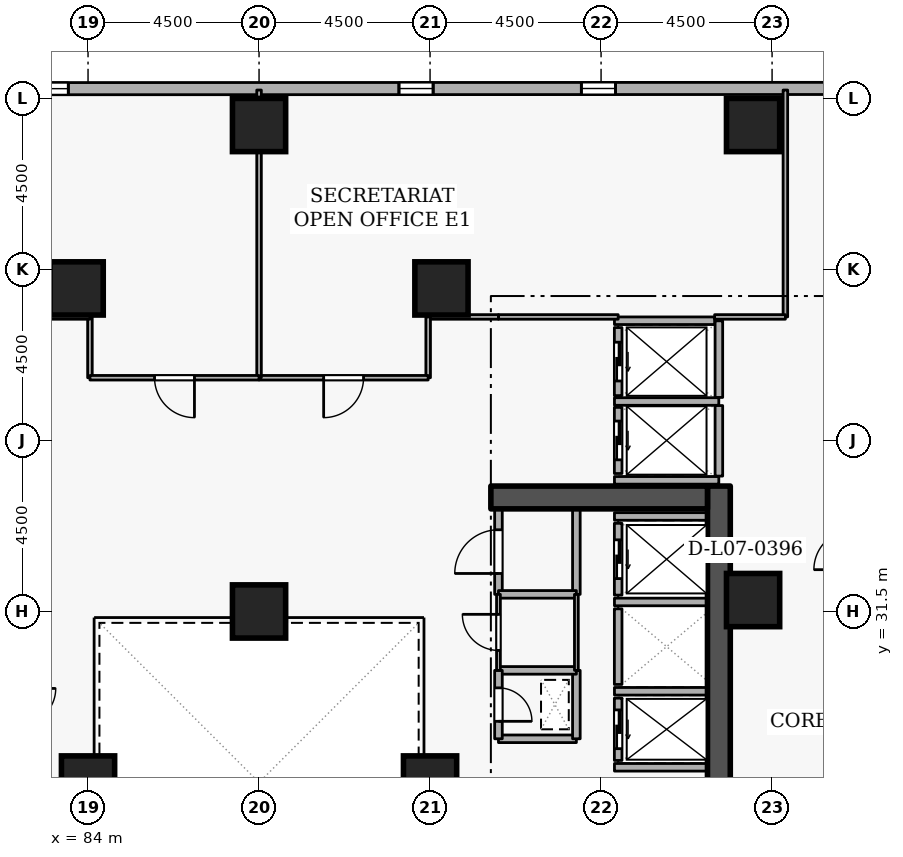
"""IFC4 building model, lengths in metres.
Left out: names, types, materials, properties, quantities, classifications, styles, units other than length and angle.
Written with IfcOpenShell. Run it as: python <this file> out.ifc"""

import sys

from ifc_helpers import new_model, si_unit, direction, frame, frame_2d, origin, origin_2d, place, context, subcontext, project, spatial, rectangle, extrude, element, fill, save


model = new_model("IFC4")
c1 = context("Model", 3, precision=1e-05, world=origin(), true_north=direction((0.0, 1.0)))
c2 = subcontext(c1, "Body", "Model", "MODEL_VIEW")
j1 = project(units=[si_unit("LENGTHUNIT", "METRE"), si_unit("PLANEANGLEUNIT", "RADIAN")], contexts=[c1])
p1 = place(None, origin())
s1 = spatial("IfcSite", under=j1, at=p1, CompositionType="ELEMENT")
p2 = place(p1, origin())
s2 = spatial("IfcBuilding", under=s1, at=p2, CompositionType="ELEMENT")
p3 = place(p2, frame((0.0, 0.0, 31.5)))
s3 = spatial("IfcBuildingStorey", under=s2, at=p3, CompositionType="ELEMENT", Elevation=31.5)
p4 = place(p3, frame((100.6, 19.2, 0.0), z_axis=(0.0, 0.0, 1.0), x_axis=(0.0, 1.0, 0.0)))
e1 = element("IfcWall", 1, at=p4, inside=s3, PredefinedType="SHEAR", context=c2, shape_type="SweptSolid", body=[
    extrude(rectangle(XDim=15.6, YDim=0.6, at=frame_2d((7.8, 0.0))), origin(), (0.0, 0.0, 1.0), 3.6),
])
p5 = place(p3, frame((94.6, 34.5, 0.0), z_axis=(0.0, 0.0, 1.0), x_axis=(1.0, 0.0, 0.0)))
e2 = element("IfcWall", 2, at=p5, inside=s3, PredefinedType="SHEAR", context=c2, shape_type="SweptSolid", body=[
    extrude(rectangle(XDim=5.7, YDim=0.6, at=frame_2d((2.85, 0.0))), origin(), (0.0, 0.0, 1.0), 3.6),
])
for number, where, z_axis, x_axis in (
    (3, (101.5, 44.3, 0.0), (0.0, 0.0, 1.0), (1.0, 0.0, 0.0)),
    (4, (88.5, 44.3, 0.0), (0.0, 0.0, 1.0), (1.0, 0.0, 0.0)),
    (5, (93.3, 40.0, 0.0), (0.0, 0.0, 1.0), (1.0, 0.0, 0.0)),
    (6, (83.7, 40.0, 0.0), (0.0, 0.0, 1.0), (1.0, 0.0, 0.0)),
    (7, (101.5, 31.8, 0.0), (0.0, 0.0, 1.0), (1.0, 0.0, 0.0)),
    (8, (93.0, 27.0, 0.0), (0.0, 0.0, 1.0), (1.0, 0.0, 0.0)),
    (9, (84.0, 27.0, 0.0), (0.0, 0.0, 1.0), (1.0, 0.0, 0.0)),
    (10, (88.5, 31.5, 0.0), (0.0, 0.0, 1.0), (1.0, 0.0, 0.0)),
):
    element("IfcColumn", number, at=place(p3, frame(where, z_axis=z_axis, x_axis=x_axis)), inside=s3, PredefinedType="COLUMN", context=c2, shape_type="SweptSolid", body=[
        extrude(rectangle(XDim=1.4, YDim=1.4, at=origin_2d()), origin(), (0.0, 0.0, 1.0), 3.6),
    ])
p6 = place(p3, frame((110.181, 45.265, 0.0), z_axis=(0.0, 0.0, 1.0), x_axis=(-0.999999952618, -0.000307837676, 0.0)))
e11 = element("IfcWall", 11, at=p6, inside=s3, PredefinedType="STANDARD", context=c2, shape_type="SweptSolid", body=[
    extrude(rectangle(XDim=34.103, YDim=0.32, at=frame_2d((17.051, 0.0))), origin(), (0.0, 0.0, 1.0), 2.7),
])
p7 = place(p6, frame((2.7, 0.0, 0.72)))
e12 = element("IfcOpeningElement", 12, at=p7, cuts=e11, PredefinedType="OPENING", context=c2, shape_type="SweptSolid", body=[
    extrude(rectangle(XDim=0.9, YDim=1.75, at=frame_2d((0.45, 0.875))), frame((0.0, 0.17, 0.0), z_axis=(0.0, -1.0, 0.0), x_axis=(1.0, 0.0, 0.0)), (0.0, 0.0, 1.0), 0.34),
])
p8 = place(p6, frame((12.3, 0.0, 0.72)))
e13 = element("IfcOpeningElement", 13, at=p8, cuts=e11, PredefinedType="OPENING", context=c2, shape_type="SweptSolid", body=[
    extrude(rectangle(XDim=0.9, YDim=1.75, at=frame_2d((0.45, 0.875))), frame((0.0, 0.17, 0.0), z_axis=(0.0, -1.0, 0.0), x_axis=(1.0, 0.0, 0.0)), (0.0, 0.0, 1.0), 0.34),
])
p9 = place(p6, frame((17.1, 0.0, 0.72)))
e14 = element("IfcOpeningElement", 14, at=p9, cuts=e11, PredefinedType="OPENING", context=c2, shape_type="SweptSolid", body=[
    extrude(rectangle(XDim=0.9, YDim=1.75, at=frame_2d((0.45, 0.875))), frame((0.0, 0.17, 0.0), z_axis=(0.0, -1.0, 0.0), x_axis=(1.0, 0.0, 0.0)), (0.0, 0.0, 1.0), 0.34),
])
p10 = place(p6, frame((26.7, 0.0, 0.72)))
e15 = element("IfcOpeningElement", 15, at=p10, cuts=e11, PredefinedType="OPENING", context=c2, shape_type="SweptSolid", body=[
    extrude(rectangle(XDim=0.9, YDim=1.75, at=frame_2d((0.45, 0.875))), frame((0.0, 0.17, 0.0), z_axis=(0.0, -1.0, 0.0), x_axis=(1.0, 0.0, 0.0)), (0.0, 0.0, 1.0), 0.34),
])
p11 = place(p6, frame((31.5, 0.0, 0.72)))
e16 = element("IfcOpeningElement", 16, at=p11, cuts=e11, PredefinedType="OPENING", context=c2, shape_type="SweptSolid", body=[
    extrude(rectangle(XDim=0.9, YDim=1.75, at=frame_2d((0.45, 0.875))), frame((0.0, 0.17, 0.0), z_axis=(0.0, -1.0, 0.0), x_axis=(1.0, 0.0, 0.0)), (0.0, 0.0, 1.0), 0.34),
])
p12 = place(p3, frame((97.95, 29.22, 0.0), z_axis=(0.0, 0.0, 1.0), x_axis=(0.0, -1.0, 0.0)))
e17 = element("IfcWall", 17, at=p12, inside=s3, PredefinedType="STANDARD", context=c2, shape_type="SweptSolid", body=[
    extrude(rectangle(XDim=1.64, YDim=0.2, at=frame_2d((0.82, 0.0))), origin(), (0.0, 0.0, 1.0), 3.34),
])
p13 = place(p12, frame((0.31, 0.0, 0.0)))
e18 = element("IfcOpeningElement", 18, at=p13, cuts=e17, PredefinedType="OPENING", context=c2, shape_type="SweptSolid", body=[
    extrude(rectangle(XDim=1.02, YDim=2.06, at=frame_2d((0.51, 1.03))), frame((0.0, 0.11, 0.0), z_axis=(0.0, -1.0, 0.0), x_axis=(1.0, 0.0, 0.0)), (0.0, 0.0, 1.0), 0.22),
])
p14 = place(p3, frame((97.95, 31.57, 0.0), z_axis=(0.0, 0.0, 1.0), x_axis=(0.0, -1.0, 0.0)))
e19 = element("IfcWall", 19, at=p14, inside=s3, PredefinedType="STANDARD", context=c2, shape_type="SweptSolid", body=[
    extrude(rectangle(XDim=1.99, YDim=0.2, at=frame_2d((0.995, 0.0))), origin(), (0.0, 0.0, 1.0), 3.34),
])
p15 = place(p3, frame((97.95, 33.82, 0.0), z_axis=(0.0, 0.0, 1.0), x_axis=(0.0, -1.0, 0.0)))
e20 = element("IfcWall", 20, at=p15, inside=s3, PredefinedType="STANDARD", context=c2, shape_type="SweptSolid", body=[
    extrude(rectangle(XDim=1.89, YDim=0.2, at=frame_2d((0.945, 0.0))), origin(), (0.0, 0.0, 1.0), 3.34),
])
p16 = place(p15, frame((0.435, 0.0, 0.0)))
e21 = element("IfcOpeningElement", 21, at=p16, cuts=e20, PredefinedType="OPENING", context=c2, shape_type="SweptSolid", body=[
    extrude(rectangle(XDim=1.02, YDim=2.06, at=frame_2d((0.51, 1.03))), frame((0.0, 0.11, 0.0), z_axis=(0.0, -1.0, 0.0), x_axis=(1.0, 0.0, 0.0)), (0.0, 0.0, 1.0), 0.22),
])
p17 = place(p3, frame((97.95, 36.87, 0.0), z_axis=(0.0, 0.0, 1.0), x_axis=(0.0, -1.0, 0.0)))
e22 = element("IfcWall", 22, at=p17, inside=s3, PredefinedType="STANDARD", context=c2, shape_type="SweptSolid", body=[
    extrude(rectangle(XDim=1.74, YDim=0.2, at=frame_2d((0.87, 0.0))), origin(), (0.0, 0.0, 1.0), 3.34),
])
p18 = place(p17, frame((0.36, 0.0, 0.0)))
e23 = element("IfcOpeningElement", 23, at=p18, cuts=e22, PredefinedType="OPENING", context=c2, shape_type="SweptSolid", body=[
    extrude(rectangle(XDim=1.02, YDim=2.06, at=frame_2d((0.51, 1.03))), frame((0.0, 0.11, 0.0), z_axis=(0.0, -1.0, 0.0), x_axis=(1.0, 0.0, 0.0)), (0.0, 0.0, 1.0), 0.22),
])
p19 = place(p3, frame((97.95, 38.97, 0.0), z_axis=(0.0, 0.0, 1.0), x_axis=(0.0, -1.0, 0.0)))
e24 = element("IfcWall", 24, at=p19, inside=s3, PredefinedType="STANDARD", context=c2, shape_type="SweptSolid", body=[
    extrude(rectangle(XDim=1.79, YDim=0.2, at=frame_2d((0.895, 0.0))), origin(), (0.0, 0.0, 1.0), 3.34),
])
p20 = place(p19, frame((0.385, 0.0, 0.0)))
e25 = element("IfcOpeningElement", 25, at=p20, cuts=e24, PredefinedType="OPENING", context=c2, shape_type="SweptSolid", body=[
    extrude(rectangle(XDim=1.02, YDim=2.06, at=frame_2d((0.51, 1.03))), frame((0.0, 0.11, 0.0), z_axis=(0.0, -1.0, 0.0), x_axis=(1.0, 0.0, 0.0)), (0.0, 0.0, 1.0), 0.22),
])
for number, where, z_axis, x_axis in (
    (26, (97.852, 29.4, 0.0), (0.0, 0.0, 1.0), (1.0, 0.0, 0.0)),
    (27, (97.852, 27.4, 0.0), (0.0, 0.0, 1.0), (1.0, 0.0, 0.0)),
    (28, (97.852, 31.75, 0.0), (0.0, 0.0, 1.0), (1.0, 0.0, 0.0)),
    (29, (97.852, 34.0, 0.0), (0.0, 0.0, 1.0), (1.0, 0.0, 0.0)),
):
    element("IfcWall", number, at=place(p3, frame(where, z_axis=z_axis, x_axis=x_axis)), inside=s3, PredefinedType="STANDARD", context=c2, shape_type="SweptSolid", body=[
        extrude(rectangle(XDim=2.436, YDim=0.2, at=frame_2d((1.218, 0.0))), origin(), (0.0, 0.0, 1.0), 3.34),
    ])
for number, where, z_axis, x_axis in (
    (30, (97.852, 37.025, 0.0), (0.0, 0.0, 1.0), (1.0, 0.0, 0.0)),
    (31, (97.852, 34.95, 0.0), (0.0, 0.0, 1.0), (1.0, 0.0, 0.0)),
):
    element("IfcWall", number, at=place(p3, frame(where, z_axis=z_axis, x_axis=x_axis)), inside=s3, PredefinedType="STANDARD", context=c2, shape_type="SweptSolid", body=[
        extrude(rectangle(XDim=2.746, YDim=0.2, at=frame_2d((1.373, 0.0))), origin(), (0.0, 0.0, 1.0), 3.34),
    ])
p21 = place(p3, frame((100.6, 35.062, 0.0), z_axis=(0.0, 0.0, 1.0), x_axis=(0.0, 1.0, 0.0)))
e32 = element("IfcWall", 32, at=p21, inside=s3, PredefinedType="STANDARD", context=c2, shape_type="SweptSolid", body=[
    extrude(rectangle(XDim=1.856, YDim=0.2, at=frame_2d((0.928, 0.0))), origin(), (0.0, 0.0, 1.0), 3.34),
])
p22 = place(p3, frame((100.6, 37.132, 0.0), z_axis=(0.0, 0.0, 1.0), x_axis=(0.0, 1.0, 0.0)))
e33 = element("IfcWall", 33, at=p22, inside=s3, PredefinedType="STANDARD", context=c2, shape_type="SweptSolid", body=[
    extrude(rectangle(XDim=2.016, YDim=0.2, at=frame_2d((1.008, 0.0))), origin(), (0.0, 0.0, 1.0), 3.34),
])
p23 = place(p3, frame((97.852, 39.15, 0.0), z_axis=(0.0, 0.0, 1.0), x_axis=(1.0, 0.0, 0.0)))
e34 = element("IfcWall", 34, at=p23, inside=s3, PredefinedType="STANDARD", context=c2, shape_type="SweptSolid", body=[
    extrude(rectangle(XDim=2.636, YDim=0.2, at=frame_2d((1.318, 0.0))), origin(), (0.0, 0.0, 1.0), 3.34),
])
p24 = place(p3, frame((94.8, 28.15, 0.0), z_axis=(0.0, 0.0, 1.0), x_axis=(1.0, 0.0, 0.0)))
e35 = element("IfcWall", 35, at=p24, inside=s3, PredefinedType="STANDARD", context=c2, shape_type="SweptSolid", body=[
    extrude(rectangle(XDim=2.05, YDim=0.2, at=frame_2d((1.025, 0.0))), origin(), (0.0, 0.0, 1.0), 3.34),
])
p25 = place(p3, frame((96.85, 28.15, 0.0), z_axis=(0.0, 0.0, 1.0), x_axis=(0.0, 1.0, 0.0)))
e36 = element("IfcWall", 36, at=p25, inside=s3, PredefinedType="STANDARD", context=c2, shape_type="SweptSolid", body=[
    extrude(rectangle(XDim=1.8, YDim=0.2, at=frame_2d((0.9, 0.0))), origin(), (0.0, 0.0, 1.0), 3.34),
])
p26 = place(p3, frame((96.85, 29.95, 0.0), z_axis=(0.0, 0.0, 1.0), x_axis=(-1.0, 0.0, 0.0)))
e37 = element("IfcWall", 37, at=p26, inside=s3, PredefinedType="STANDARD", context=c2, shape_type="SweptSolid", body=[
    extrude(rectangle(XDim=2.05, YDim=0.2, at=frame_2d((1.025, 0.0))), origin(), (0.0, 0.0, 1.0), 3.34),
])
p27 = place(p3, frame((94.8, 29.95, 0.0), z_axis=(0.0, 0.0, 1.0), x_axis=(0.0, -1.0, 0.0)))
e38 = element("IfcWall", 38, at=p27, inside=s3, PredefinedType="STANDARD", context=c2, shape_type="SweptSolid", body=[
    extrude(rectangle(XDim=1.8, YDim=0.2, at=frame_2d((0.9, 0.0))), origin(), (0.0, 0.0, 1.0), 3.34),
])
p28 = place(p27, frame((0.46, 0.0, 0.0)))
e39 = element("IfcOpeningElement", 39, at=p28, cuts=e38, PredefinedType="OPENING", context=c2, shape_type="SweptSolid", body=[
    extrude(rectangle(XDim=0.88, YDim=2.04, at=frame_2d((0.44, 1.02))), frame((0.0, 0.11, 0.0), z_axis=(0.0, -1.0, 0.0), x_axis=(1.0, 0.0, 0.0)), (0.0, 0.0, 1.0), 0.22),
])
p29 = place(p3, frame((94.8, 31.95, 0.0), z_axis=(0.0, 0.0, 1.0), x_axis=(0.0, 1.0, 0.0)))
e40 = element("IfcWall", 40, at=p29, inside=s3, PredefinedType="STANDARD", context=c2, shape_type="SweptSolid", body=[
    extrude(rectangle(XDim=2.25, YDim=0.2, at=frame_2d((1.125, 0.0))), origin(), (0.0, 0.0, 1.0), 3.34),
])
p30 = place(p29, frame((0.55, 0.0, 0.0)))
e41 = element("IfcOpeningElement", 41, at=p30, cuts=e40, PredefinedType="OPENING", context=c2, shape_type="SweptSolid", body=[
    extrude(rectangle(XDim=1.15, YDim=2.1, at=frame_2d((0.575, 1.05))), frame((0.0, 0.11, 0.0), z_axis=(0.0, -1.0, 0.0), x_axis=(1.0, 0.0, 0.0)), (0.0, 0.0, 1.0), 0.22),
])
p31 = place(p3, frame((96.85, 34.2, 0.0), z_axis=(0.0, 0.0, 1.0), x_axis=(0.0, -1.0, 0.0)))
e42 = element("IfcWall", 42, at=p31, inside=s3, PredefinedType="STANDARD", context=c2, shape_type="SweptSolid", body=[
    extrude(rectangle(XDim=2.25, YDim=0.2, at=frame_2d((1.125, 0.0))), origin(), (0.0, 0.0, 1.0), 3.34),
])
p32 = place(p3, frame((96.85, 31.95, 0.0), z_axis=(0.0, 0.0, 1.0), x_axis=(-1.0, 0.0, 0.0)))
e43 = element("IfcWall", 43, at=p32, inside=s3, PredefinedType="STANDARD", context=c2, shape_type="SweptSolid", body=[
    extrude(rectangle(XDim=2.05, YDim=0.2, at=frame_2d((1.025, 0.0))), origin(), (0.0, 0.0, 1.0), 3.34),
])
p33 = place(p3, frame((94.8, 29.95, 0.0), z_axis=(0.0, 0.0, 1.0), x_axis=(0.0, 1.0, 0.0)))
e44 = element("IfcWall", 44, at=p33, inside=s3, PredefinedType="PARTITIONING", context=c2, shape_type="SweptSolid", body=[
    extrude(rectangle(XDim=2.0, YDim=0.1, at=frame_2d((1.0, 0.0))), origin(), (0.0, 0.0, 1.0), 3.34),
])
p34 = place(p33, frame((0.525, 0.0, 0.0)))
e45 = element("IfcOpeningElement", 45, at=p34, cuts=e44, PredefinedType="OPENING", context=c2, shape_type="SweptSolid", body=[
    extrude(rectangle(XDim=0.95, YDim=2.1, at=frame_2d((0.475, 1.05))), frame((0.0, 0.06, 0.0), z_axis=(0.0, -1.0, 0.0), x_axis=(1.0, 0.0, 0.0)), (0.0, 0.0, 1.0), 0.12),
])
p35 = place(p3, frame((96.85, 31.95, 0.0), z_axis=(0.0, 0.0, 1.0), x_axis=(0.0, -1.0, 0.0)))
e46 = element("IfcWall", 46, at=p35, inside=s3, PredefinedType="PARTITIONING", context=c2, shape_type="SweptSolid", body=[
    extrude(rectangle(XDim=2.0, YDim=0.1, at=frame_2d((1.0, 0.0))), origin(), (0.0, 0.0, 1.0), 3.34),
])
p36 = place(p3, frame((97.95, 39.25, 0.0), z_axis=(0.0, 0.0, 1.0), x_axis=(-1.0, 0.0, 0.0)))
e47 = element("IfcWall", 47, at=p36, inside=s3, PredefinedType="PARTITIONING", context=c2, shape_type="SweptSolid", body=[
    extrude(rectangle(XDim=3.15, YDim=0.12, at=frame_2d((1.575, 0.0))), origin(), (0.0, 0.0, 1.0), 3.34),
])
p37 = place(p3, frame((94.8, 39.25, 0.0), z_axis=(0.0, 0.0, 1.0), x_axis=(-1.0, 0.0, 0.0)))
e48 = element("IfcWall", 48, at=p37, inside=s3, PredefinedType="PARTITIONING", context=c2, shape_type="SweptSolid", body=[
    extrude(rectangle(XDim=1.85, YDim=0.12, at=frame_2d((0.925, 0.0))), origin(), (0.0, 0.0, 1.0), 3.34),
])
p38 = place(p3, frame((92.95, 39.25, 0.0), z_axis=(0.0, 0.0, 1.0), x_axis=(0.0, -1.0, 0.0)))
e49 = element("IfcWall", 49, at=p38, inside=s3, PredefinedType="PARTITIONING", context=c2, shape_type="SweptSolid", body=[
    extrude(rectangle(XDim=1.6, YDim=0.12, at=frame_2d((0.8, 0.0))), origin(), (0.0, 0.0, 1.0), 3.34),
])
p39 = place(p3, frame((92.95, 37.65, 0.0), z_axis=(0.0, 0.0, 1.0), x_axis=(-1.0, 0.0, 0.0)))
e50 = element("IfcWall", 50, at=p39, inside=s3, PredefinedType="PARTITIONING", context=c2, shape_type="SweptSolid", body=[
    extrude(rectangle(XDim=4.45, YDim=0.12, at=frame_2d((2.225, 0.0))), origin(), (0.0, 0.0, 1.0), 3.34),
])
p40 = place(p39, frame((1.7, 0.0, 0.0)))
e51 = element("IfcOpeningElement", 51, at=p40, cuts=e50, PredefinedType="OPENING", context=c2, shape_type="SweptSolid", body=[
    extrude(rectangle(XDim=1.05, YDim=2.1, at=frame_2d((0.525, 1.05))), frame((0.0, 0.07, 0.0), z_axis=(0.0, -1.0, 0.0), x_axis=(1.0, 0.0, 0.0)), (0.0, 0.0, 1.0), 0.14),
])
p41 = place(p3, frame((88.5, 37.65, 0.0), z_axis=(0.0, 0.0, 1.0), x_axis=(0.0, 1.0, 0.0)))
e52 = element("IfcWall", 52, at=p41, inside=s3, PredefinedType="PARTITIONING", context=c2, shape_type="SweptSolid", body=[
    extrude(rectangle(XDim=7.57, YDim=0.12, at=frame_2d((3.785, 0.0))), origin(), (0.0, 0.0, 1.0), 2.878),
])
p42 = place(p3, frame((102.35, 45.22, 0.0), z_axis=(0.0, 0.0, 1.0), x_axis=(0.0, -1.0, 0.0)))
e53 = element("IfcWall", 53, at=p42, inside=s3, PredefinedType="PARTITIONING", context=c2, shape_type="SweptSolid", body=[
    extrude(rectangle(XDim=5.97, YDim=0.12, at=frame_2d((2.985, 0.0))), origin(), (0.0, 0.0, 1.0), 3.34),
])
p43 = place(p3, frame((102.35, 39.25, 0.0), z_axis=(0.0, 0.0, 1.0), x_axis=(-1.0, 0.0, 0.0)))
e54 = element("IfcWall", 54, at=p43, inside=s3, PredefinedType="PARTITIONING", context=c2, shape_type="SweptSolid", body=[
    extrude(rectangle(XDim=1.862, YDim=0.12, at=frame_2d((0.931, 0.0))), origin(), (0.0, 0.0, 1.0), 3.34),
])
p44 = place(p3, frame((84.05, 37.65, 0.0), z_axis=(0.0, 0.0, 1.0), x_axis=(0.0, 1.0, 0.0)))
e55 = element("IfcWall", 55, at=p44, inside=s3, PredefinedType="PARTITIONING", context=c2, shape_type="SweptSolid", body=[
    extrude(rectangle(XDim=1.6, YDim=0.12, at=frame_2d((0.8, 0.0))), origin(), (0.0, 0.0, 1.0), 3.34),
])
p45 = place(p3, frame((84.05, 39.25, 0.0), z_axis=(0.0, 0.0, 1.0), x_axis=(-1.0, 0.0, 0.0)))
e56 = element("IfcWall", 56, at=p45, inside=s3, PredefinedType="PARTITIONING", context=c2, shape_type="SweptSolid", body=[
    extrude(rectangle(XDim=1.85, YDim=0.12, at=frame_2d((0.925, 0.0))), origin(), (0.0, 0.0, 1.0), 3.34),
])
p46 = place(p3, frame((88.5, 37.65, 0.0), z_axis=(0.0, 0.0, 1.0), x_axis=(-1.0, 0.0, 0.0)))
e57 = element("IfcWall", 57, at=p46, inside=s3, PredefinedType="PARTITIONING", context=c2, shape_type="SweptSolid", body=[
    extrude(rectangle(XDim=4.45, YDim=0.12, at=frame_2d((2.225, 0.0))), origin(), (0.0, 0.0, 1.0), 3.34),
])
p47 = place(p46, frame((1.7, 0.0, 0.0)))
e58 = element("IfcOpeningElement", 58, at=p47, cuts=e57, PredefinedType="OPENING", context=c2, shape_type="SweptSolid", body=[
    extrude(rectangle(XDim=1.05, YDim=2.1, at=frame_2d((0.525, 1.05))), frame((0.0, 0.07, 0.0), z_axis=(0.0, -1.0, 0.0), x_axis=(1.0, 0.0, 0.0)), (0.0, 0.0, 1.0), 0.14),
])
p48 = place(p8, origin())
e59 = element("IfcWindow", 59, at=p48, inside=s3, PartitioningType="SINGLE_PANEL", PredefinedType="WINDOW", context=c2, shape_type="SweptSolid", body=[
    extrude(rectangle(XDim=0.9, YDim=1.75, at=frame_2d((0.45, 0.875))), frame((0.0, 0.03, 0.0), z_axis=(0.0, -1.0, 0.0), x_axis=(1.0, 0.0, 0.0)), (0.0, 0.0, 1.0), 0.06),
])
fill(e13, e59)
p49 = place(p9, origin())
e60 = element("IfcWindow", 60, at=p49, inside=s3, PartitioningType="SINGLE_PANEL", PredefinedType="WINDOW", context=c2, shape_type="SweptSolid", body=[
    extrude(rectangle(XDim=0.9, YDim=1.75, at=frame_2d((0.45, 0.875))), frame((0.0, 0.03, 0.0), z_axis=(0.0, -1.0, 0.0), x_axis=(1.0, 0.0, 0.0)), (0.0, 0.0, 1.0), 0.06),
])
fill(e14, e60)
p50 = place(p10, origin())
e61 = element("IfcWindow", 61, at=p50, inside=s3, PartitioningType="SINGLE_PANEL", PredefinedType="WINDOW", context=c2, shape_type="SweptSolid", body=[
    extrude(rectangle(XDim=0.9, YDim=1.75, at=frame_2d((0.45, 0.875))), frame((0.0, 0.03, 0.0), z_axis=(0.0, -1.0, 0.0), x_axis=(1.0, 0.0, 0.0)), (0.0, 0.0, 1.0), 0.06),
])
fill(e15, e61)
p51 = place(p13, origin())
e62 = element("IfcDoor", 62, at=p51, inside=s3, OperationType="SLIDING_TO_LEFT", PredefinedType="DOOR", context=c2, shape_type="SweptSolid", body=[
    extrude(rectangle(XDim=1.02, YDim=2.06, at=frame_2d((0.51, 1.03))), frame((0.0, 0.025, 0.0), z_axis=(0.0, -1.0, 0.0), x_axis=(1.0, 0.0, 0.0)), (0.0, 0.0, 1.0), 0.05),
])
fill(e18, e62)
p52 = place(p16, origin())
e63 = element("IfcDoor", 63, at=p52, inside=s3, OperationType="SLIDING_TO_LEFT", PredefinedType="DOOR", context=c2, shape_type="SweptSolid", body=[
    extrude(rectangle(XDim=1.02, YDim=2.06, at=frame_2d((0.51, 1.03))), frame((0.0, 0.025, 0.0), z_axis=(0.0, -1.0, 0.0), x_axis=(1.0, 0.0, 0.0)), (0.0, 0.0, 1.0), 0.05),
])
fill(e21, e63)
p53 = place(p18, origin())
e64 = element("IfcDoor", 64, at=p53, inside=s3, OperationType="SLIDING_TO_LEFT", PredefinedType="DOOR", context=c2, shape_type="SweptSolid", body=[
    extrude(rectangle(XDim=1.02, YDim=2.06, at=frame_2d((0.51, 1.03))), frame((0.0, 0.025, 0.0), z_axis=(0.0, -1.0, 0.0), x_axis=(1.0, 0.0, 0.0)), (0.0, 0.0, 1.0), 0.05),
])
fill(e23, e64)
p54 = place(p20, origin())
e65 = element("IfcDoor", 65, at=p54, inside=s3, OperationType="SLIDING_TO_LEFT", PredefinedType="DOOR", context=c2, shape_type="SweptSolid", body=[
    extrude(rectangle(XDim=1.02, YDim=2.06, at=frame_2d((0.51, 1.03))), frame((0.0, 0.025, 0.0), z_axis=(0.0, -1.0, 0.0), x_axis=(1.0, 0.0, 0.0)), (0.0, 0.0, 1.0), 0.05),
])
fill(e25, e65)
p55 = place(p28, origin())
e66 = element("IfcDoor", 66, at=p55, inside=s3, OperationType="SINGLE_SWING_RIGHT", PredefinedType="DOOR", context=c2, shape_type="SweptSolid", body=[
    extrude(rectangle(XDim=0.88, YDim=2.04, at=frame_2d((0.44, 1.02))), frame((0.0, 0.025, 0.0), z_axis=(0.0, -1.0, 0.0), x_axis=(1.0, 0.0, 0.0)), (0.0, 0.0, 1.0), 0.05),
])
fill(e39, e66)
p56 = place(p34, origin())
e67 = element("IfcDoor", 67, at=p56, inside=s3, OperationType="SINGLE_SWING_RIGHT", PredefinedType="DOOR", context=c2, shape_type="SweptSolid", body=[
    extrude(rectangle(XDim=0.95, YDim=2.1, at=frame_2d((0.475, 1.05))), frame((0.0, 0.025, 0.0), z_axis=(0.0, -1.0, 0.0), x_axis=(1.0, 0.0, 0.0)), (0.0, 0.0, 1.0), 0.05),
])
fill(e45, e67)
p57 = place(p30, origin())
e68 = element("IfcDoor", 68, at=p57, inside=s3, OperationType="SINGLE_SWING_LEFT", PredefinedType="DOOR", context=c2, shape_type="SweptSolid", body=[
    extrude(rectangle(XDim=1.15, YDim=2.1, at=frame_2d((0.575, 1.05))), frame((0.0, 0.025, 0.0), z_axis=(0.0, -1.0, 0.0), x_axis=(1.0, 0.0, 0.0)), (0.0, 0.0, 1.0), 0.05),
])
fill(e41, e68)
p58 = place(p40, origin())
e69 = element("IfcDoor", 69, at=p58, inside=s3, OperationType="SINGLE_SWING_RIGHT", PredefinedType="DOOR", context=c2, shape_type="SweptSolid", body=[
    extrude(rectangle(XDim=1.05, YDim=2.1, at=frame_2d((0.525, 1.05))), frame((0.0, 0.025, 0.0), z_axis=(0.0, -1.0, 0.0), x_axis=(1.0, 0.0, 0.0)), (0.0, 0.0, 1.0), 0.05),
])
fill(e51, e69)
p59 = place(p47, origin())
e70 = element("IfcDoor", 70, at=p59, inside=s3, OperationType="SINGLE_SWING_LEFT", PredefinedType="DOOR", context=c2, shape_type="SweptSolid", body=[
    extrude(rectangle(XDim=1.05, YDim=2.1, at=frame_2d((0.525, 1.05))), frame((0.0, 0.025, 0.0), z_axis=(0.0, -1.0, 0.0), x_axis=(1.0, 0.0, 0.0)), (0.0, 0.0, 1.0), 0.05),
])
fill(e58, e70)
save(model, sys.argv[1])
